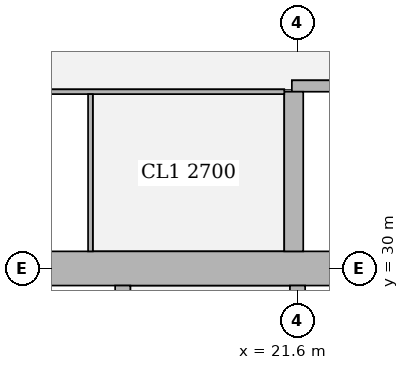
"""IFC4 building model, lengths in metres.
Left out: names, types, materials, properties, quantities, classifications, styles, units other than length and angle.
Written with IfcOpenShell. Run it as: python <this file> out.ifc"""

import sys

from ifc_helpers import new_model, si_unit, direction, frame, frame_2d, origin, place, context, subcontext, project, spatial, rectangle, extrude, element, fill, save


model = new_model("IFC4")
c1 = context("Model", 3, precision=1e-05, world=origin(), true_north=direction((0.0, 1.0)))
c2 = subcontext(c1, "Body", "Model", "MODEL_VIEW")
j1 = project(units=[si_unit("LENGTHUNIT", "METRE"), si_unit("PLANEANGLEUNIT", "RADIAN")], contexts=[c1])
p1 = place(None, origin())
s1 = spatial("IfcSite", under=j1, at=p1, CompositionType="ELEMENT")
p2 = place(p1, origin())
s2 = spatial("IfcBuilding", under=s1, at=p2, CompositionType="ELEMENT")
p3 = place(p2, frame((0.0, 0.0, 111.65)))
s3 = spatial("IfcBuildingStorey", under=s2, at=p3, CompositionType="ELEMENT", Elevation=111.65)
p4 = place(p3, frame((13.95, 30.0, 0.0), z_axis=(0.0, 0.0, 1.0), x_axis=(1.0, 0.0, 0.0)))
e1 = element("IfcWall", 1, at=p4, inside=s3, PredefinedType="SHEAR", context=c2, shape_type="SweptSolid", body=[
    extrude(rectangle(XDim=15.3, YDim=0.9, at=frame_2d((7.65, 0.0))), origin(), (0.0, 0.0, 1.0), 3.75),
])
p5 = place(p4, frame((4.45, 0.0, 0.0)))
e2 = element("IfcOpeningElement", 2, at=p5, cuts=e1, PredefinedType="OPENING", context=c2, shape_type="SweptSolid", body=[
    extrude(rectangle(XDim=1.8, YDim=2.1, at=frame_2d((0.9, 1.05))), frame((0.0, 0.46, 0.0), z_axis=(0.0, -1.0, 0.0), x_axis=(1.0, 0.0, 0.0)), (0.0, 0.0, 1.0), 0.92),
])
p6 = place(p4, frame((10.7, 0.0, 0.0)))
e3 = element("IfcOpeningElement", 3, at=p6, cuts=e1, PredefinedType="OPENING", context=c2, shape_type="SweptSolid", body=[
    extrude(rectangle(XDim=1.1, YDim=2.1, at=frame_2d((0.55, 1.05))), frame((0.0, 0.46, 0.0), z_axis=(0.0, -1.0, 0.0), x_axis=(1.0, 0.0, 0.0)), (0.0, 0.0, 1.0), 0.92),
])
p7 = place(p3, frame((17.0, 15.45, 0.0), z_axis=(0.0, 0.0, 1.0), x_axis=(0.0, 1.0, 0.0)))
e4 = element("IfcWall", 4, at=p7, inside=s3, PredefinedType="SHEAR", context=c2, shape_type="SweptSolid", body=[
    extrude(rectangle(XDim=14.1, YDim=0.4, at=frame_2d((7.05, 0.0))), origin(), (0.0, 0.0, 1.0), 3.75),
])
p8 = place(p7, frame((0.875, 0.0, 0.0)))
e5 = element("IfcOpeningElement", 5, at=p8, cuts=e4, PredefinedType="OPENING", context=c2, shape_type="SweptSolid", body=[
    extrude(rectangle(XDim=1.1, YDim=2.1, at=frame_2d((0.55, 1.05))), frame((0.0, 0.21, 0.0), z_axis=(0.0, -1.0, 0.0), x_axis=(1.0, 0.0, 0.0)), (0.0, 0.0, 1.0), 0.42),
])
p9 = place(p7, frame((4.625, 0.0, 0.0)))
e6 = element("IfcOpeningElement", 6, at=p9, cuts=e4, PredefinedType="OPENING", context=c2, shape_type="SweptSolid", body=[
    extrude(rectangle(XDim=1.1, YDim=2.1, at=frame_2d((0.55, 1.05))), frame((0.0, 0.21, 0.0), z_axis=(0.0, -1.0, 0.0), x_axis=(1.0, 0.0, 0.0)), (0.0, 0.0, 1.0), 0.42),
])
p10 = place(p7, frame((8.375, 0.0, 0.0)))
e7 = element("IfcOpeningElement", 7, at=p10, cuts=e4, PredefinedType="OPENING", context=c2, shape_type="SweptSolid", body=[
    extrude(rectangle(XDim=1.1, YDim=2.1, at=frame_2d((0.55, 1.05))), frame((0.0, 0.21, 0.0), z_axis=(0.0, -1.0, 0.0), x_axis=(1.0, 0.0, 0.0)), (0.0, 0.0, 1.0), 0.42),
])
p11 = place(p7, frame((12.125, 0.0, 0.0)))
e8 = element("IfcOpeningElement", 8, at=p11, cuts=e4, PredefinedType="OPENING", context=c2, shape_type="SweptSolid", body=[
    extrude(rectangle(XDim=1.1, YDim=2.1, at=frame_2d((0.55, 1.05))), frame((0.0, 0.21, 0.0), z_axis=(0.0, -1.0, 0.0), x_axis=(1.0, 0.0, 0.0)), (0.0, 0.0, 1.0), 0.42),
])
p12 = place(p3, frame((21.6, 15.45, 0.0), z_axis=(0.0, 0.0, 1.0), x_axis=(0.0, 1.0, 0.0)))
e9 = element("IfcWall", 9, at=p12, inside=s3, PredefinedType="SHEAR", context=c2, shape_type="SweptSolid", body=[
    extrude(rectangle(XDim=14.1, YDim=0.4, at=frame_2d((7.05, 0.0))), origin(), (0.0, 0.0, 1.0), 3.75),
])
p13 = place(p3, frame((21.45, 34.8, 0.0), z_axis=(0.0, 0.0, 1.0), x_axis=(1.0, 0.0, 0.0)))
e10 = element("IfcWall", 10, at=p13, inside=s3, PredefinedType="SHEAR", context=c2, shape_type="SweptSolid", body=[
    extrude(rectangle(XDim=7.5, YDim=0.3, at=frame_2d((3.75, 0.0))), origin(), (0.0, 0.0, 1.0), 3.75),
])
p14 = place(p13, frame((0.5, 0.0, 0.0)))
e11 = element("IfcOpeningElement", 11, at=p14, cuts=e10, PredefinedType="OPENING", context=c2, shape_type="SweptSolid", body=[
    extrude(rectangle(XDim=1.1, YDim=2.1, at=frame_2d((0.55, 1.05))), frame((0.0, 0.16, 0.0), z_axis=(0.0, -1.0, 0.0), x_axis=(1.0, 0.0, 0.0)), (0.0, 0.0, 1.0), 0.32),
])
p15 = place(p3, frame((21.5, 30.45, 0.0), z_axis=(0.0, 0.0, 1.0), x_axis=(0.0, 1.0, 0.0)))
e12 = element("IfcWall", 12, at=p15, inside=s3, PredefinedType="SHEAR", context=c2, shape_type="SweptSolid", body=[
    extrude(rectangle(XDim=4.2, YDim=0.5, at=frame_2d((2.1, 0.0))), origin(), (0.0, 0.0, 1.0), 3.75),
])
p16 = place(p3, frame((10.413, 34.65, 0.0), z_axis=(0.0, 0.0, 1.0), x_axis=(1.0, 0.0, 0.0)))
e13 = element("IfcWall", 13, at=p16, inside=s3, PredefinedType="PARTITIONING", context=c2, shape_type="SweptSolid", body=[
    extrude(rectangle(XDim=10.837, YDim=0.125, at=frame_2d((5.418, 0.0))), origin(), (0.0, 0.0, 1.0), 3.5),
])
p17 = place(p16, frame((7.487, 0.0, 0.0)))
e14 = element("IfcOpeningElement", 14, at=p17, cuts=e13, PredefinedType="OPENING", context=c2, shape_type="SweptSolid", body=[
    extrude(rectangle(XDim=1.8, YDim=2.1, at=frame_2d((0.9, 1.05))), frame((0.0, 0.073, 0.0), z_axis=(0.0, -1.0, 0.0), x_axis=(1.0, 0.0, 0.0)), (0.0, 0.0, 1.0), 0.145),
])
p18 = place(p3, frame((16.15, 30.45, 0.0), z_axis=(0.0, 0.0, 1.0), x_axis=(0.0, 1.0, 0.0)))
e15 = element("IfcWall", 15, at=p18, inside=s3, PredefinedType="PARTITIONING", context=c2, shape_type="SweptSolid", body=[
    extrude(rectangle(XDim=4.137, YDim=0.125, at=frame_2d((2.068, 0.0))), origin(), (0.0, 0.0, 1.0), 3.5),
])
p19 = place(p18, frame((1.625, 0.0, 0.0)))
e16 = element("IfcOpeningElement", 16, at=p19, cuts=e15, PredefinedType="OPENING", context=c2, shape_type="SweptSolid", body=[
    extrude(rectangle(XDim=1.0, YDim=2.1, at=frame_2d((0.5, 1.05))), frame((0.0, 0.073, 0.0), z_axis=(0.0, -1.0, 0.0), x_axis=(1.0, 0.0, 0.0)), (0.0, 0.0, 1.0), 0.145),
])
p20 = place(p19, origin())
e17 = element("IfcDoor", 17, at=p20, inside=s3, OperationType="SINGLE_SWING_RIGHT", PredefinedType="DOOR", context=c2, shape_type="SweptSolid", body=[
    extrude(rectangle(XDim=1.0, YDim=2.1, at=frame_2d((0.5, 1.05))), frame((0.0, 0.025, 0.0), z_axis=(0.0, -1.0, 0.0), x_axis=(1.0, 0.0, 0.0)), (0.0, 0.0, 1.0), 0.05),
])
fill(e16, e17)
p21 = place(p17, origin())
e18 = element("IfcDoor", 18, at=p21, inside=s3, OperationType="DOUBLE_DOOR_SINGLE_SWING", PredefinedType="DOOR", context=c2, shape_type="SweptSolid", body=[
    extrude(rectangle(XDim=1.8, YDim=2.1, at=frame_2d((0.9, 1.05))), frame((0.0, 0.025, 0.0), z_axis=(0.0, -1.0, 0.0), x_axis=(1.0, 0.0, 0.0)), (0.0, 0.0, 1.0), 0.05),
])
fill(e14, e18)
p22 = place(p5, origin())
e19 = element("IfcDoor", 19, at=p22, inside=s3, OperationType="DOUBLE_DOOR_SINGLE_SWING", PredefinedType="DOOR", context=c2, shape_type="SweptSolid", body=[
    extrude(rectangle(XDim=1.8, YDim=2.1, at=frame_2d((0.9, 1.05))), frame((0.0, 0.025, 0.0), z_axis=(0.0, -1.0, 0.0), x_axis=(1.0, 0.0, 0.0)), (0.0, 0.0, 1.0), 0.05),
])
fill(e2, e19)
p23 = place(p14, origin())
e20 = element("IfcDoor", 20, at=p23, inside=s3, OperationType="SINGLE_SWING_RIGHT", PredefinedType="DOOR", context=c2, shape_type="SweptSolid", body=[
    extrude(rectangle(XDim=1.1, YDim=2.1, at=frame_2d((0.55, 1.05))), frame((0.0, 0.025, 0.0), z_axis=(0.0, -1.0, 0.0), x_axis=(1.0, 0.0, 0.0)), (0.0, 0.0, 1.0), 0.05),
])
fill(e11, e20)
save(model, sys.argv[1])
